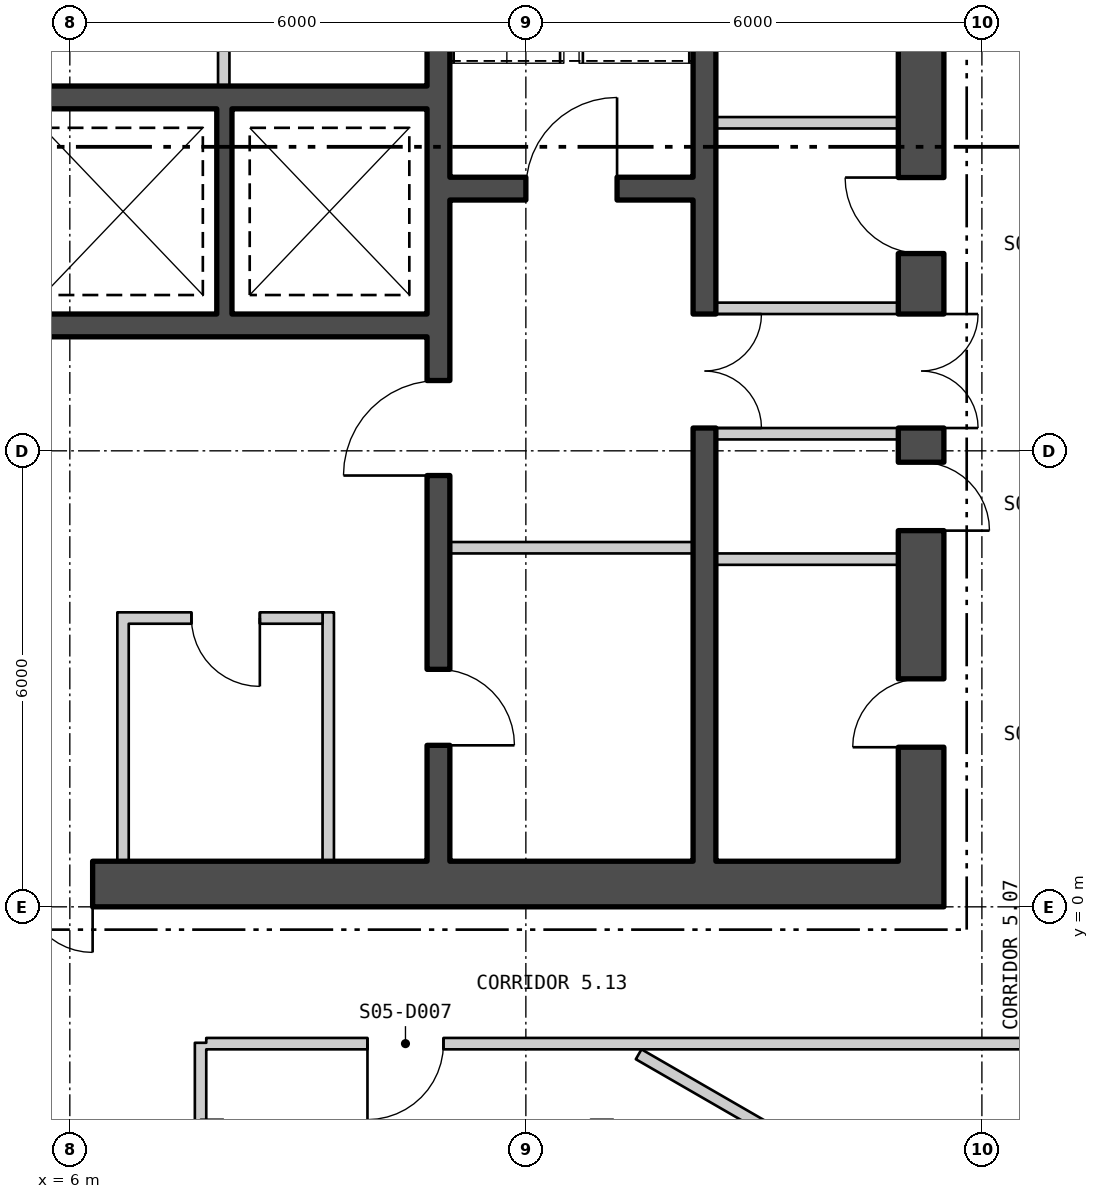
"""IFC4 building model, lengths in metres.
Left out: names, types, materials, properties, quantities, classifications, styles, units other than length and angle.
Written with IfcOpenShell. Run it as: python <this file> out.ifc"""

import sys

from ifc_helpers import new_model, si_unit, direction, frame, frame_2d, origin, origin_2d, place, context, subcontext, project, spatial, polyline, rectangle, i_section, outline, extrude, element, fill, save


model = new_model("IFC4")
c1 = context("Model", 3, precision=1e-05, world=origin(), true_north=direction((0.0, 1.0)))
c2 = subcontext(c1, "Body", "Model", "MODEL_VIEW")
j1 = project(units=[si_unit("LENGTHUNIT", "METRE"), si_unit("PLANEANGLEUNIT", "RADIAN")], contexts=[c1])
p1 = place(None, origin())
s1 = spatial("IfcSite", under=j1, at=p1, CompositionType="ELEMENT")
p2 = place(p1, origin())
s2 = spatial("IfcBuilding", under=s1, at=p2, CompositionType="ELEMENT")
p3 = place(p2, frame((0.0, 0.0, 69.3)))
s3 = spatial("IfcBuildingStorey", under=s2, at=p3, CompositionType="ELEMENT", Elevation=69.3)
for number, where, z_axis, x_axis in (
    (1, (7.87, -3.2, 0.0), (0.0, 0.0, 1.0), (1.0, 0.0, 0.0)),
    (2, (13.0, -3.2, 0.0), (0.0, 0.0, 1.0), (1.0, 0.0, 0.0)),
):
    element("IfcColumn", number, at=place(p3, frame(where, z_axis=z_axis, x_axis=x_axis)), inside=s3, PredefinedType="COLUMN", context=c2, shape_type="SweptSolid", body=[
        extrude(i_section(OverallWidth=0.303, OverallDepth=0.814, WebThickness=0.021, FlangeThickness=0.04, at=origin_2d()), origin(), (0.0, 0.0, 1.0), 4.5),
    ])
p4 = place(p3, frame((5.31, -28.834, -0.18), z_axis=(0.0, 0.0, 1.0), x_axis=(0.500000711659, 0.866024992908, 0.0)))
e3 = element("IfcWall", 3, at=p4, inside=s3, PredefinedType="SOLIDWALL", context=c2, shape_type="SweptSolid", body=[
    extrude(outline(polyline([(-0.13, -0.225), (45.87, -0.225), (45.61, 0.225), (0.13, 0.225), (-0.13, -0.225)])), origin(), (0.0, 0.0, 1.0), 4.28),
])
p5 = place(p4, frame((1.424, 0.0, 1.08)))
e4 = element("IfcOpeningElement", 4, at=p5, cuts=e3, PredefinedType="OPENING", context=c2, shape_type="SweptSolid", body=[
    extrude(rectangle(XDim=2.4, YDim=2.6, at=frame_2d((1.2, 1.3))), frame((0.0, 0.235, 0.0), z_axis=(0.0, -1.0, 0.0), x_axis=(1.0, 0.0, 0.0)), (0.0, 0.0, 1.0), 0.47),
])
p6 = place(p4, frame((5.893, 0.0, 1.08)))
e5 = element("IfcOpeningElement", 5, at=p6, cuts=e3, PredefinedType="OPENING", context=c2, shape_type="SweptSolid", body=[
    extrude(rectangle(XDim=2.4, YDim=2.6, at=frame_2d((1.2, 1.3))), frame((0.0, 0.235, 0.0), z_axis=(0.0, -1.0, 0.0), x_axis=(1.0, 0.0, 0.0)), (0.0, 0.0, 1.0), 0.47),
])
p7 = place(p4, frame((10.401, 0.0, 1.08)))
e6 = element("IfcOpeningElement", 6, at=p7, cuts=e3, PredefinedType="OPENING", context=c2, shape_type="SweptSolid", body=[
    extrude(rectangle(XDim=2.4, YDim=2.6, at=frame_2d((1.2, 1.3))), frame((0.0, 0.235, 0.0), z_axis=(0.0, -1.0, 0.0), x_axis=(1.0, 0.0, 0.0)), (0.0, 0.0, 1.0), 0.47),
])
p8 = place(p4, frame((14.909, 0.0, 1.08)))
e7 = element("IfcOpeningElement", 7, at=p8, cuts=e3, PredefinedType="OPENING", context=c2, shape_type="SweptSolid", body=[
    extrude(rectangle(XDim=2.4, YDim=2.6, at=frame_2d((1.2, 1.3))), frame((0.0, 0.235, 0.0), z_axis=(0.0, -1.0, 0.0), x_axis=(1.0, 0.0, 0.0)), (0.0, 0.0, 1.0), 0.47),
])
p9 = place(p4, frame((19.416, 0.0, 1.08)))
e8 = element("IfcOpeningElement", 8, at=p9, cuts=e3, PredefinedType="OPENING", context=c2, shape_type="SweptSolid", body=[
    extrude(rectangle(XDim=2.4, YDim=2.6, at=frame_2d((1.2, 1.3))), frame((0.0, 0.235, 0.0), z_axis=(0.0, -1.0, 0.0), x_axis=(1.0, 0.0, 0.0)), (0.0, 0.0, 1.0), 0.47),
])
p10 = place(p4, frame((23.924, 0.0, 1.08)))
e9 = element("IfcOpeningElement", 9, at=p10, cuts=e3, PredefinedType="OPENING", context=c2, shape_type="SweptSolid", body=[
    extrude(rectangle(XDim=2.4, YDim=2.6, at=frame_2d((1.2, 1.3))), frame((0.0, 0.235, 0.0), z_axis=(0.0, -1.0, 0.0), x_axis=(1.0, 0.0, 0.0)), (0.0, 0.0, 1.0), 0.47),
])
p11 = place(p4, frame((28.431, 0.0, 1.08)))
e10 = element("IfcOpeningElement", 10, at=p11, cuts=e3, PredefinedType="OPENING", context=c2, shape_type="SweptSolid", body=[
    extrude(rectangle(XDim=2.4, YDim=2.6, at=frame_2d((1.2, 1.3))), frame((0.0, 0.235, 0.0), z_axis=(0.0, -1.0, 0.0), x_axis=(1.0, 0.0, 0.0)), (0.0, 0.0, 1.0), 0.47),
])
p12 = place(p4, frame((37.447, 0.0, 1.08)))
e11 = element("IfcOpeningElement", 11, at=p12, cuts=e3, PredefinedType="OPENING", context=c2, shape_type="SweptSolid", body=[
    extrude(rectangle(XDim=2.4, YDim=2.6, at=frame_2d((1.2, 1.3))), frame((0.0, 0.235, 0.0), z_axis=(0.0, -1.0, 0.0), x_axis=(1.0, 0.0, 0.0)), (0.0, 0.0, 1.0), 0.47),
])
p13 = place(p4, frame((41.916, 0.0, 1.08)))
e12 = element("IfcOpeningElement", 12, at=p13, cuts=e3, PredefinedType="OPENING", context=c2, shape_type="SweptSolid", body=[
    extrude(rectangle(XDim=2.4, YDim=2.6, at=frame_2d((1.2, 1.3))), frame((0.0, 0.235, 0.0), z_axis=(0.0, -1.0, 0.0), x_axis=(1.0, 0.0, 0.0)), (0.0, 0.0, 1.0), 0.47),
])
p14 = place(p3, frame((-17.5, 0.3, 0.0), z_axis=(0.0, 0.0, 1.0), x_axis=(1.0, 0.0, 0.0)))
e13 = element("IfcWall", 13, at=p14, inside=s3, PredefinedType="SHEAR", context=c2, shape_type="SweptSolid", body=[
    extrude(rectangle(XDim=35.0, YDim=0.6, at=frame_2d((17.5, 0.0))), origin(), (0.0, 0.0, 1.0), 4.3),
])
p15 = place(p14, frame((12.0, 0.0, 0.0)))
e14 = element("IfcOpeningElement", 14, at=p15, cuts=e13, PredefinedType="OPENING", context=c2, shape_type="SweptSolid", body=[
    extrude(rectangle(XDim=1.8, YDim=2.4, at=frame_2d((0.9, 1.2))), frame((0.0, 0.31, 0.0), z_axis=(0.0, -1.0, 0.0), x_axis=(1.0, 0.0, 0.0)), (0.0, 0.0, 1.0), 0.62),
])
p16 = place(p14, frame((22.0, 0.0, 0.0)))
e15 = element("IfcOpeningElement", 15, at=p16, cuts=e13, PredefinedType="OPENING", context=c2, shape_type="SweptSolid", body=[
    extrude(rectangle(XDim=1.8, YDim=2.4, at=frame_2d((0.9, 1.2))), frame((0.0, 0.31, 0.0), z_axis=(0.0, -1.0, 0.0), x_axis=(1.0, 0.0, 0.0)), (0.0, 0.0, 1.0), 0.62),
])
p17 = place(p3, frame((17.2, 0.6, 0.0), z_axis=(0.0, 0.0, 1.0), x_axis=(0.0, 1.0, 0.0)))
e16 = element("IfcWall", 16, at=p17, inside=s3, PredefinedType="SHEAR", context=c2, shape_type="SweptSolid", body=[
    extrude(rectangle(XDim=16.8, YDim=0.6, at=frame_2d((8.4, 0.0))), origin(), (0.0, 0.0, 1.0), 4.3),
])
p18 = place(p17, frame((5.7, 0.0, 0.0)))
e17 = element("IfcOpeningElement", 17, at=p18, cuts=e16, PredefinedType="OPENING", context=c2, shape_type="SweptSolid", body=[
    extrude(rectangle(XDim=1.5, YDim=2.1, at=frame_2d((0.75, 1.05))), frame((0.0, 0.31, 0.0), z_axis=(0.0, -1.0, 0.0), x_axis=(1.0, 0.0, 0.0)), (0.0, 0.0, 1.0), 0.62),
])
p19 = place(p17, frame((1.5, 0.0, 0.0)))
e18 = element("IfcOpeningElement", 18, at=p19, cuts=e16, PredefinedType="OPENING", context=c2, shape_type="SweptSolid", body=[
    extrude(rectangle(XDim=0.9, YDim=2.1, at=frame_2d((0.45, 1.05))), frame((0.0, 0.31, 0.0), z_axis=(0.0, -1.0, 0.0), x_axis=(1.0, 0.0, 0.0)), (0.0, 0.0, 1.0), 0.62),
])
p20 = place(p17, frame((4.35, 0.0, 0.0)))
e19 = element("IfcOpeningElement", 19, at=p20, cuts=e16, PredefinedType="OPENING", context=c2, shape_type="SweptSolid", body=[
    extrude(rectangle(XDim=0.9, YDim=2.1, at=frame_2d((0.45, 1.05))), frame((0.0, 0.31, 0.0), z_axis=(0.0, -1.0, 0.0), x_axis=(1.0, 0.0, 0.0)), (0.0, 0.0, 1.0), 0.62),
])
p21 = place(p17, frame((7.996, 0.0, 0.0)))
e20 = element("IfcOpeningElement", 20, at=p21, cuts=e16, PredefinedType="OPENING", context=c2, shape_type="SweptSolid", body=[
    extrude(rectangle(XDim=1.0, YDim=2.1, at=frame_2d((0.5, 1.05))), frame((0.0, 0.31, 0.0), z_axis=(0.0, -1.0, 0.0), x_axis=(1.0, 0.0, 0.0)), (0.0, 0.0, 1.0), 0.62),
])
p22 = place(p17, frame((12.846, 0.0, 0.0)))
e21 = element("IfcOpeningElement", 21, at=p22, cuts=e16, PredefinedType="OPENING", context=c2, shape_type="SweptSolid", body=[
    extrude(rectangle(XDim=0.9, YDim=2.1, at=frame_2d((0.45, 1.05))), frame((0.0, 0.31, 0.0), z_axis=(0.0, -1.0, 0.0), x_axis=(1.0, 0.0, 0.0)), (0.0, 0.0, 1.0), 0.62),
])
p23 = place(p3, frame((10.85, 0.6, 0.0), z_axis=(0.0, 0.0, 1.0), x_axis=(0.0, 1.0, 0.0)))
e22 = element("IfcWall", 22, at=p23, inside=s3, PredefinedType="SHEAR", context=c2, shape_type="SweptSolid", body=[
    extrude(rectangle(XDim=16.8, YDim=0.3, at=frame_2d((8.4, 0.0))), origin(), (0.0, 0.0, 1.0), 4.3),
])
p24 = place(p23, frame((5.075, 0.0, 0.0)))
e23 = element("IfcOpeningElement", 23, at=p24, cuts=e22, PredefinedType="OPENING", context=c2, shape_type="SweptSolid", body=[
    extrude(rectangle(XDim=1.25, YDim=2.1, at=frame_2d((0.625, 1.05))), frame((0.0, 0.16, 0.0), z_axis=(0.0, -1.0, 0.0), x_axis=(1.0, 0.0, 0.0)), (0.0, 0.0, 1.0), 0.32),
])
p25 = place(p23, frame((1.525, 0.0, 0.0)))
e24 = element("IfcOpeningElement", 24, at=p25, cuts=e22, PredefinedType="OPENING", context=c2, shape_type="SweptSolid", body=[
    extrude(rectangle(XDim=1.0, YDim=2.1, at=frame_2d((0.5, 1.05))), frame((0.0, 0.16, 0.0), z_axis=(0.0, -1.0, 0.0), x_axis=(1.0, 0.0, 0.0)), (0.0, 0.0, 1.0), 0.32),
])
p26 = place(p3, frame((14.35, 0.6, 0.0), z_axis=(0.0, 0.0, 1.0), x_axis=(0.0, 1.0, 0.0)))
e25 = element("IfcWall", 25, at=p26, inside=s3, PredefinedType="SHEAR", context=c2, shape_type="SweptSolid", body=[
    extrude(rectangle(XDim=16.8, YDim=0.3, at=frame_2d((8.4, 0.0))), origin(), (0.0, 0.0, 1.0), 4.3),
])
p27 = place(p26, frame((5.7, 0.0, 0.0)))
e26 = element("IfcOpeningElement", 26, at=p27, cuts=e25, PredefinedType="OPENING", context=c2, shape_type="SweptSolid", body=[
    extrude(rectangle(XDim=1.5, YDim=2.1, at=frame_2d((0.75, 1.05))), frame((0.0, 0.16, 0.0), z_axis=(0.0, -1.0, 0.0), x_axis=(1.0, 0.0, 0.0)), (0.0, 0.0, 1.0), 0.32),
])
p28 = place(p3, frame((11.0, 9.45, 0.0), z_axis=(0.0, 0.0, 1.0), x_axis=(1.0, 0.0, 0.0)))
e27 = element("IfcWall", 27, at=p28, inside=s3, PredefinedType="SHEAR", context=c2, shape_type="SweptSolid", body=[
    extrude(rectangle(XDim=3.2, YDim=0.3, at=frame_2d((1.6, 0.0))), origin(), (0.0, 0.0, 1.0), 4.3),
])
p29 = place(p28, frame((1.0, 0.0, 0.0)))
e28 = element("IfcOpeningElement", 28, at=p29, cuts=e27, PredefinedType="OPENING", context=c2, shape_type="SweptSolid", body=[
    extrude(rectangle(XDim=1.2, YDim=2.1, at=frame_2d((0.6, 1.05))), frame((0.0, 0.16, 0.0), z_axis=(0.0, -1.0, 0.0), x_axis=(1.0, 0.0, 0.0)), (0.0, 0.0, 1.0), 0.32),
])
for number, where, z_axis, x_axis in (
    (29, (2.6, 10.65, 0.0), (0.0, 0.0, 1.0), (1.0, 0.0, 0.0)),
    (30, (2.6, 7.65, 0.0), (0.0, 0.0, 1.0), (1.0, 0.0, 0.0)),
):
    element("IfcWall", number, at=place(p3, frame(where, z_axis=z_axis, x_axis=x_axis)), inside=s3, PredefinedType="SHEAR", context=c2, shape_type="SweptSolid", body=[
        extrude(rectangle(XDim=8.1, YDim=0.3, at=frame_2d((4.05, 0.0))), origin(), (0.0, 0.0, 1.0), 4.3),
    ])
p30 = place(p3, frame((8.033, 7.8, 0.0), z_axis=(0.0, 0.0, 1.0), x_axis=(0.0, 1.0, 0.0)))
e31 = element("IfcWall", 31, at=p30, inside=s3, PredefinedType="SHEAR", context=c2, shape_type="SweptSolid", body=[
    extrude(rectangle(XDim=2.7, YDim=0.2, at=frame_2d((1.35, 0.0))), origin(), (0.0, 0.0, 1.0), 4.3),
])
p31 = place(p3, frame((8.025, 10.8, 0.0), z_axis=(0.0, 0.0, 1.0), x_axis=(0.0, 1.0, 0.0)))
e32 = element("IfcWall", 32, at=p31, inside=s3, PredefinedType="PARTITIONING", context=c2, shape_type="SweptSolid", body=[
    extrude(rectangle(XDim=3.6, YDim=0.15, at=frame_2d((1.8, 0.0))), origin(), (0.0, 0.0, 1.0), 4.3),
])
p32 = place(p31, frame((1.175, 0.0, 0.0)))
e33 = element("IfcOpeningElement", 33, at=p32, cuts=e32, PredefinedType="OPENING", context=c2, shape_type="SweptSolid", body=[
    extrude(rectangle(XDim=1.25, YDim=2.1, at=frame_2d((0.625, 1.05))), frame((0.0, 0.085, 0.0), z_axis=(0.0, -1.0, 0.0), x_axis=(1.0, 0.0, 0.0)), (0.0, 0.0, 1.0), 0.17),
])
p33 = place(p3, frame((11.0, 4.725, 0.0), z_axis=(0.0, 0.0, 1.0), x_axis=(1.0, 0.0, 0.0)))
e34 = element("IfcWall", 34, at=p33, inside=s3, PredefinedType="PARTITIONING", context=c2, shape_type="SweptSolid", body=[
    extrude(rectangle(XDim=3.2, YDim=0.15, at=frame_2d((1.6, 0.0))), origin(), (0.0, 0.0, 1.0), 4.3),
])
for number, where, z_axis, x_axis in (
    (35, (14.5, 6.225, 0.0), (0.0, 0.0, 1.0), (1.0, 0.0, 0.0)),
    (36, (14.5, 7.875, 0.0), (0.0, 0.0, 1.0), (1.0, 0.0, 0.0)),
    (37, (14.5, 4.575, 0.0), (0.0, 0.0, 1.0), (1.0, 0.0, 0.0)),
    (38, (14.5, 10.317, 0.0), (0.0, 0.0, 1.0), (1.0, 0.0, 0.0)),
):
    element("IfcWall", number, at=place(p3, frame(where, z_axis=z_axis, x_axis=x_axis)), inside=s3, PredefinedType="PARTITIONING", context=c2, shape_type="SweptSolid", body=[
        extrude(rectangle(XDim=2.4, YDim=0.15, at=frame_2d((1.2, 0.0))), origin(), (0.0, 0.0, 1.0), 4.3),
    ])
for number, where, z_axis, x_axis in (
    (39, (6.7, 0.6, 0.0), (0.0, 0.0, 1.0), (0.0, 1.0, 0.0)),
    (40, (9.4, 0.6, 0.0), (0.0, 0.0, 1.0), (0.0, 1.0, 0.0)),
):
    element("IfcWall", number, at=place(p3, frame(where, z_axis=z_axis, x_axis=x_axis)), inside=s3, PredefinedType="PARTITIONING", context=c2, shape_type="SweptSolid", body=[
        extrude(rectangle(XDim=3.275, YDim=0.15, at=frame_2d((1.637, 0.0))), origin(), (0.0, 0.0, 1.0), 4.3),
    ])
p34 = place(p3, frame((6.775, 3.8, 0.0), z_axis=(0.0, 0.0, 1.0), x_axis=(1.0, 0.0, 0.0)))
e41 = element("IfcWall", 41, at=p34, inside=s3, PredefinedType="PARTITIONING", context=c2, shape_type="SweptSolid", body=[
    extrude(rectangle(XDim=2.55, YDim=0.15, at=frame_2d((1.275, 0.0))), origin(), (0.0, 0.0, 1.0), 4.3),
])
p35 = place(p34, frame((0.825, 0.0, 0.0)))
e42 = element("IfcOpeningElement", 42, at=p35, cuts=e41, PredefinedType="OPENING", context=c2, shape_type="SweptSolid", body=[
    extrude(rectangle(XDim=0.9, YDim=2.1, at=frame_2d((0.45, 1.05))), frame((0.0, 0.085, 0.0), z_axis=(0.0, -1.0, 0.0), x_axis=(1.0, 0.0, 0.0)), (0.0, 0.0, 1.0), 0.17),
])
p36 = place(p3, frame((7.72, -3.557, 0.0), z_axis=(0.0, 0.0, 1.0), x_axis=(0.0, 1.0, 0.0)))
e43 = element("IfcWall", 43, at=p36, inside=s3, PredefinedType="PARTITIONING", context=c2, shape_type="SweptSolid", body=[
    extrude(rectangle(XDim=1.768, YDim=0.15, at=frame_2d((0.884, 0.0))), origin(), (0.0, 0.0, 1.0), 4.3),
])
p37 = place(p3, frame((7.795, -1.8, 0.0), z_axis=(0.0, 0.0, 1.0), x_axis=(1.0, 0.0, 0.0)))
e44 = element("IfcWall", 44, at=p37, inside=s3, PredefinedType="PARTITIONING", context=c2, shape_type="SweptSolid", body=[
    extrude(rectangle(XDim=11.43, YDim=0.15, at=frame_2d((5.715, 0.0))), origin(), (0.0, 0.0, 1.0), 4.3),
])
p38 = place(p37, frame((2.121, 0.0, 0.0)))
e45 = element("IfcOpeningElement", 45, at=p38, cuts=e44, PredefinedType="OPENING", context=c2, shape_type="SweptSolid", body=[
    extrude(rectangle(XDim=1.0, YDim=2.1, at=frame_2d((0.5, 1.05))), frame((0.0, 0.085, 0.0), z_axis=(0.0, -1.0, 0.0), x_axis=(1.0, 0.0, 0.0)), (0.0, 0.0, 1.0), 0.17),
])
p39 = place(p3, frame((13.484, -1.94, 0.0), z_axis=(0.0, 0.0, 1.0), x_axis=(0.866018876994, -0.500011304563, 0.0)))
e46 = element("IfcWall", 46, at=p39, inside=s3, PredefinedType="PARTITIONING", context=c2, shape_type="SweptSolid", body=[
    extrude(rectangle(XDim=5.694, YDim=0.15, at=frame_2d((2.847, 0.0))), origin(), (0.0, 0.0, 1.0), 4.3),
])
p40 = place(p29, origin())
e47 = element("IfcDoor", 47, at=p40, inside=s3, OperationType="SINGLE_SWING_LEFT", PredefinedType="DOOR", context=c2, shape_type="SweptSolid", body=[
    extrude(rectangle(XDim=1.2, YDim=2.1, at=frame_2d((0.6, 1.05))), frame((0.0, 0.025, 0.0), z_axis=(0.0, -1.0, 0.0), x_axis=(1.0, 0.0, 0.0)), (0.0, 0.0, 1.0), 0.05),
])
fill(e28, e47)
p41 = place(p24, origin())
e48 = element("IfcDoor", 48, at=p41, inside=s3, OperationType="SINGLE_SWING_RIGHT", PredefinedType="DOOR", context=c2, shape_type="SweptSolid", body=[
    extrude(rectangle(XDim=1.25, YDim=2.1, at=frame_2d((0.625, 1.05))), frame((0.0, 0.025, 0.0), z_axis=(0.0, -1.0, 0.0), x_axis=(1.0, 0.0, 0.0)), (0.0, 0.0, 1.0), 0.05),
])
fill(e23, e48)
p42 = place(p25, origin())
e49 = element("IfcDoor", 49, at=p42, inside=s3, OperationType="SINGLE_SWING_LEFT", PredefinedType="DOOR", context=c2, shape_type="SweptSolid", body=[
    extrude(rectangle(XDim=1.0, YDim=2.1, at=frame_2d((0.5, 1.05))), frame((0.0, 0.025, 0.0), z_axis=(0.0, -1.0, 0.0), x_axis=(1.0, 0.0, 0.0)), (0.0, 0.0, 1.0), 0.05),
])
fill(e24, e49)
p43 = place(p27, origin())
e50 = element("IfcDoor", 50, at=p43, inside=s3, OperationType="DOUBLE_DOOR_SINGLE_SWING", PredefinedType="DOOR", context=c2, shape_type="SweptSolid", body=[
    extrude(rectangle(XDim=1.5, YDim=2.1, at=frame_2d((0.75, 1.05))), frame((0.0, 0.025, 0.0), z_axis=(0.0, -1.0, 0.0), x_axis=(1.0, 0.0, 0.0)), (0.0, 0.0, 1.0), 0.05),
])
fill(e26, e50)
p44 = place(p18, origin())
e51 = element("IfcDoor", 51, at=p44, inside=s3, OperationType="DOUBLE_DOOR_SINGLE_SWING", PredefinedType="DOOR", context=c2, shape_type="SweptSolid", body=[
    extrude(rectangle(XDim=1.5, YDim=2.1, at=frame_2d((0.75, 1.05))), frame((0.0, 0.025, 0.0), z_axis=(0.0, -1.0, 0.0), x_axis=(1.0, 0.0, 0.0)), (0.0, 0.0, 1.0), 0.05),
])
fill(e17, e51)
p45 = place(p19, origin())
e52 = element("IfcDoor", 52, at=p45, inside=s3, OperationType="SINGLE_SWING_RIGHT", PredefinedType="DOOR", context=c2, shape_type="SweptSolid", body=[
    extrude(rectangle(XDim=0.9, YDim=2.1, at=frame_2d((0.45, 1.05))), frame((0.0, 0.025, 0.0), z_axis=(0.0, -1.0, 0.0), x_axis=(1.0, 0.0, 0.0)), (0.0, 0.0, 1.0), 0.05),
])
fill(e18, e52)
p46 = place(p20, origin())
e53 = element("IfcDoor", 53, at=p46, inside=s3, OperationType="SINGLE_SWING_LEFT", PredefinedType="DOOR", context=c2, shape_type="SweptSolid", body=[
    extrude(rectangle(XDim=0.9, YDim=2.1, at=frame_2d((0.45, 1.05))), frame((0.0, 0.025, 0.0), z_axis=(0.0, -1.0, 0.0), x_axis=(1.0, 0.0, 0.0)), (0.0, 0.0, 1.0), 0.05),
])
fill(e19, e53)
p47 = place(p21, origin())
e54 = element("IfcDoor", 54, at=p47, inside=s3, OperationType="SINGLE_SWING_LEFT", PredefinedType="DOOR", context=c2, shape_type="SweptSolid", body=[
    extrude(rectangle(XDim=1.0, YDim=2.1, at=frame_2d((0.5, 1.05))), frame((0.0, 0.025, 0.0), z_axis=(0.0, -1.0, 0.0), x_axis=(1.0, 0.0, 0.0)), (0.0, 0.0, 1.0), 0.05),
])
fill(e20, e54)
p48 = place(p35, origin())
e55 = element("IfcDoor", 55, at=p48, inside=s3, OperationType="SINGLE_SWING_RIGHT", PredefinedType="DOOR", context=c2, shape_type="SweptSolid", body=[
    extrude(rectangle(XDim=0.9, YDim=2.1, at=frame_2d((0.45, 1.05))), frame((0.0, 0.025, 0.0), z_axis=(0.0, -1.0, 0.0), x_axis=(1.0, 0.0, 0.0)), (0.0, 0.0, 1.0), 0.05),
])
fill(e42, e55)
p49 = place(p16, origin())
e56 = element("IfcDoor", 56, at=p49, inside=s3, OperationType="DOUBLE_DOOR_SINGLE_SWING", PredefinedType="DOOR", context=c2, shape_type="SweptSolid", body=[
    extrude(rectangle(XDim=1.8, YDim=2.4, at=frame_2d((0.9, 1.2))), frame((0.0, 0.025, 0.0), z_axis=(0.0, -1.0, 0.0), x_axis=(1.0, 0.0, 0.0)), (0.0, 0.0, 1.0), 0.05),
])
fill(e15, e56)
p50 = place(p38, origin())
e57 = element("IfcDoor", 57, at=p50, inside=s3, OperationType="SINGLE_SWING_LEFT", PredefinedType="DOOR", context=c2, shape_type="SweptSolid", body=[
    extrude(rectangle(XDim=1.0, YDim=2.1, at=frame_2d((0.5, 1.05))), frame((0.0, 0.025, 0.0), z_axis=(0.0, -1.0, 0.0), x_axis=(1.0, 0.0, 0.0)), (0.0, 0.0, 1.0), 0.05),
])
fill(e45, e57)
save(model, sys.argv[1])
